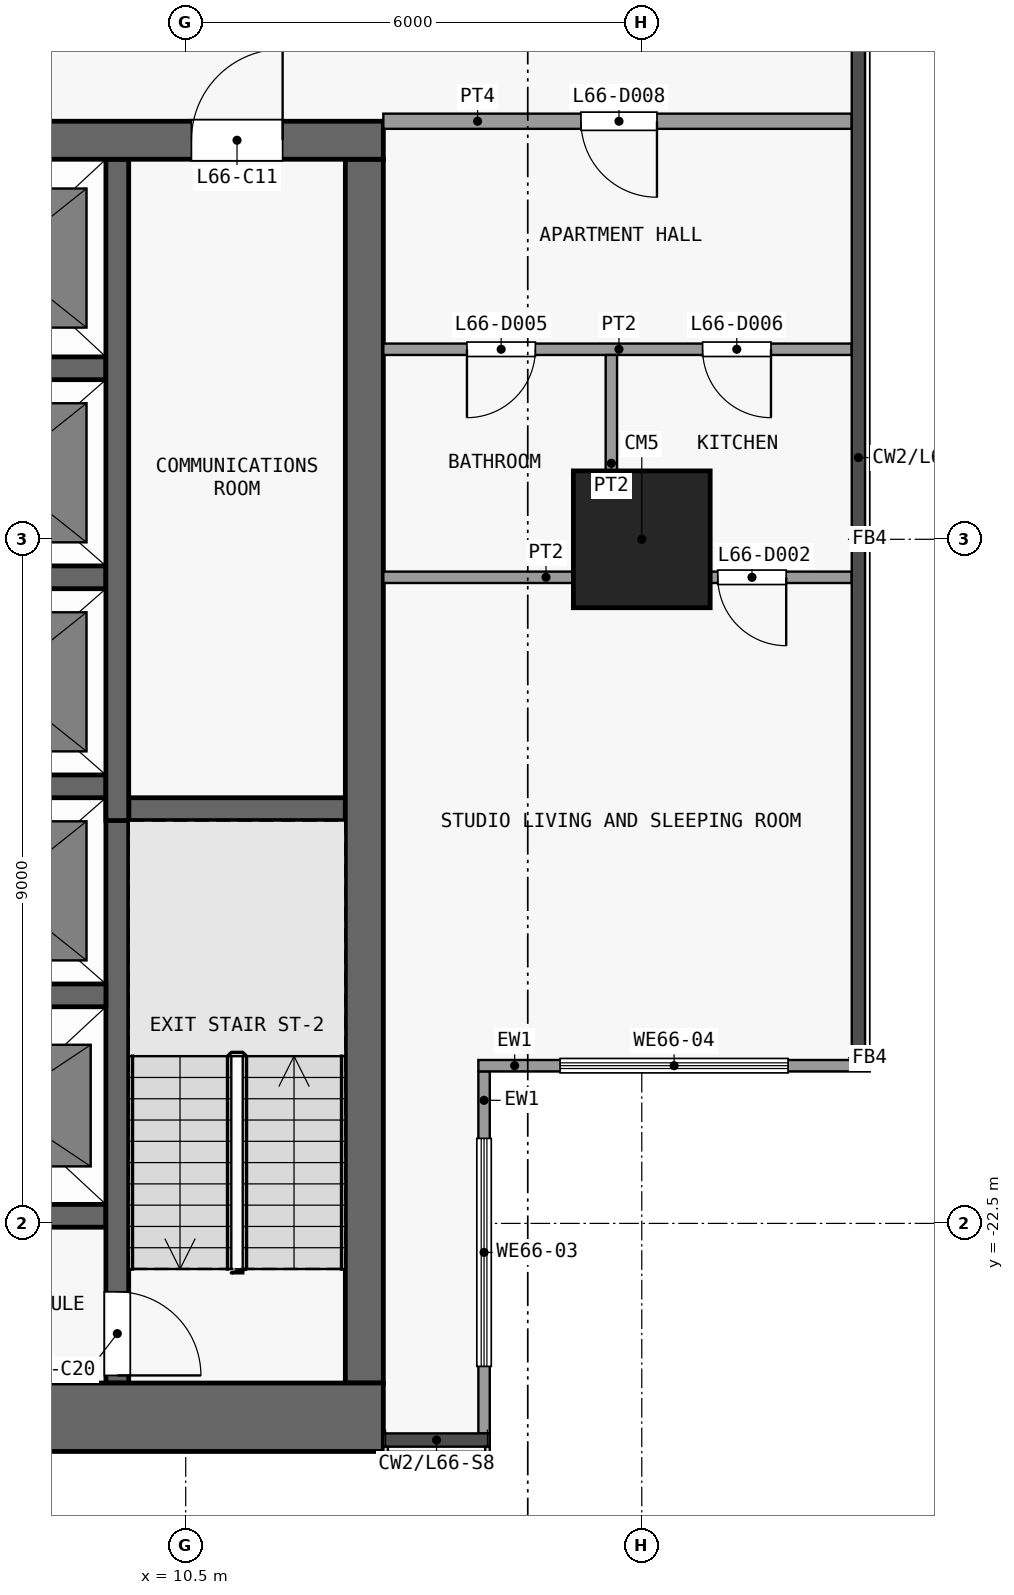
"""IFC4 building model, lengths in metres.
Left out: names, types, materials, properties, quantities, classifications, styles, units other than length and angle.
Written with IfcOpenShell. Run it as: python <this file> out.ifc"""

import sys

from ifc_helpers import new_model, si_unit, direction, frame, frame_2d, origin, origin_2d, place, context, subcontext, project, spatial, rectangle, extrude, element, fill, save


model = new_model("IFC4")
c1 = context("Model", 3, precision=1e-05, world=origin(), true_north=direction((0.0, 1.0)))
c2 = subcontext(c1, "Body", "Model", "MODEL_VIEW")
j1 = project(units=[si_unit("LENGTHUNIT", "METRE"), si_unit("PLANEANGLEUNIT", "RADIAN")], contexts=[c1])
p1 = place(None, origin())
s1 = spatial("IfcSite", under=j1, at=p1, CompositionType="ELEMENT")
p2 = place(p1, origin())
s2 = spatial("IfcBuilding", under=s1, at=p2, CompositionType="ELEMENT")
p3 = place(p2, frame((0.0, 0.0, 262.7)))
s3 = spatial("IfcBuildingStorey", under=s2, at=p3, CompositionType="ELEMENT", Elevation=262.7)
p4 = place(p3, frame((16.5, -13.5, 0.0), z_axis=(0.0, 0.0, 1.0), x_axis=(1.0, 0.0, 0.0)))
e1 = element("IfcColumn", 1, at=p4, inside=s3, PredefinedType="COLUMN", context=c2, shape_type="SweptSolid", body=[
    extrude(rectangle(XDim=1.8, YDim=1.8, at=origin_2d()), origin(), (0.0, 0.0, 1.0), 3.6),
])
p5 = place(p3, frame((-13.1, -25.05, 0.0), z_axis=(0.0, 0.0, 1.0), x_axis=(1.0, 0.0, 0.0)))
e2 = element("IfcWall", 2, at=p5, inside=s3, PredefinedType="SHEAR", context=c2, shape_type="SweptSolid", body=[
    extrude(rectangle(XDim=26.2, YDim=0.9, at=frame_2d((13.1, 0.0))), origin(), (0.0, 0.0, 1.0), 3.3),
])
p6 = place(p3, frame((-13.1, -8.25, 0.0), z_axis=(0.0, 0.0, 1.0), x_axis=(1.0, 0.0, 0.0)))
e3 = element("IfcWall", 3, at=p6, inside=s3, PredefinedType="SHEAR", context=c2, shape_type="SweptSolid", body=[
    extrude(rectangle(XDim=26.2, YDim=0.5, at=frame_2d((13.1, 0.0))), origin(), (0.0, 0.0, 1.0), 3.3),
])
p7 = place(p6, frame((7.4, 0.0, 0.0)))
e4 = element("IfcOpeningElement", 4, at=p7, cuts=e3, PredefinedType="OPENING", context=c2, shape_type="SweptSolid", body=[
    extrude(rectangle(XDim=1.8, YDim=2.1, at=frame_2d((0.9, 1.05))), frame((0.0, 0.26, 0.0), z_axis=(0.0, -1.0, 0.0), x_axis=(1.0, 0.0, 0.0)), (0.0, 0.0, 1.0), 0.52),
])
p8 = place(p6, frame((17.0, 0.0, 0.0)))
e5 = element("IfcOpeningElement", 5, at=p8, cuts=e3, PredefinedType="OPENING", context=c2, shape_type="SweptSolid", body=[
    extrude(rectangle(XDim=1.8, YDim=2.1, at=frame_2d((0.9, 1.05))), frame((0.0, 0.26, 0.0), z_axis=(0.0, -1.0, 0.0), x_axis=(1.0, 0.0, 0.0)), (0.0, 0.0, 1.0), 0.52),
])
p9 = place(p6, frame((2.325, 0.0, 0.0)))
e6 = element("IfcOpeningElement", 6, at=p9, cuts=e3, PredefinedType="OPENING", context=c2, shape_type="SweptSolid", body=[
    extrude(rectangle(XDim=0.9, YDim=2.1, at=frame_2d((0.45, 1.05))), frame((0.0, 0.26, 0.0), z_axis=(0.0, -1.0, 0.0), x_axis=(1.0, 0.0, 0.0)), (0.0, 0.0, 1.0), 0.52),
])
p10 = place(p6, frame((23.675, 0.0, 0.0)))
e7 = element("IfcOpeningElement", 7, at=p10, cuts=e3, PredefinedType="OPENING", context=c2, shape_type="SweptSolid", body=[
    extrude(rectangle(XDim=1.2, YDim=2.1, at=frame_2d((0.6, 1.05))), frame((0.0, 0.26, 0.0), z_axis=(0.0, -1.0, 0.0), x_axis=(1.0, 0.0, 0.0)), (0.0, 0.0, 1.0), 0.52),
])
p11 = place(p3, frame((12.85, -24.6, 0.0), z_axis=(0.0, 0.0, 1.0), x_axis=(0.0, 1.0, 0.0)))
e8 = element("IfcWall", 8, at=p11, inside=s3, PredefinedType="SHEAR", context=c2, shape_type="SweptSolid", body=[
    extrude(rectangle(XDim=16.1, YDim=0.5, at=frame_2d((8.05, 0.0))), origin(), (0.0, 0.0, 1.0), 3.3),
])
for number, where, z_axis, x_axis in (
    (9, (6.65, -22.4, 0.0), (0.0, 0.0, 1.0), (1.0, 0.0, 0.0)),
    (10, (6.65, -19.5, 0.0), (0.0, 0.0, 1.0), (1.0, 0.0, 0.0)),
):
    element("IfcWall", number, at=place(p3, frame(where, z_axis=z_axis, x_axis=x_axis)), inside=s3, PredefinedType="SHEAR", context=c2, shape_type="SweptSolid", body=[
        extrude(rectangle(XDim=2.8, YDim=0.3, at=frame_2d((1.4, 0.0))), origin(), (0.0, 0.0, 1.0), 3.3),
    ])
p12 = place(p3, frame((9.75, -17.05, 0.0), z_axis=(0.0, 0.0, 1.0), x_axis=(1.0, 0.0, 0.0)))
e11 = element("IfcWall", 11, at=p12, inside=s3, PredefinedType="SHEAR", context=c2, shape_type="SweptSolid", body=[
    extrude(rectangle(XDim=2.85, YDim=0.3, at=frame_2d((1.425, 0.0))), origin(), (0.0, 0.0, 1.0), 3.3),
])
for number, where, z_axis, x_axis in (
    (12, (6.65, -16.75, 0.0), (0.0, 0.0, 1.0), (1.0, 0.0, 0.0)),
    (13, (6.65, -14.0, 0.0), (0.0, 0.0, 1.0), (1.0, 0.0, 0.0)),
    (14, (6.65, -11.25, 0.0), (0.0, 0.0, 1.0), (1.0, 0.0, 0.0)),
):
    element("IfcWall", number, at=place(p3, frame(where, z_axis=z_axis, x_axis=x_axis)), inside=s3, PredefinedType="SHEAR", context=c2, shape_type="SweptSolid", body=[
        extrude(rectangle(XDim=2.8, YDim=0.3, at=frame_2d((1.4, 0.0))), origin(), (0.0, 0.0, 1.0), 3.3),
    ])
p13 = place(p3, frame((9.6, -16.9, 0.0), z_axis=(0.0, 0.0, 1.0), x_axis=(0.0, -1.0, 0.0)))
e15 = element("IfcWall", 15, at=p13, inside=s3, PredefinedType="SHEAR", context=c2, shape_type="SweptSolid", body=[
    extrude(rectangle(XDim=7.7, YDim=0.3, at=frame_2d((3.85, 0.0))), origin(), (0.0, 0.0, 1.0), 3.3),
])
p14 = place(p13, frame((6.5, 0.0, 0.0)))
e16 = element("IfcOpeningElement", 16, at=p14, cuts=e15, PredefinedType="OPENING", context=c2, shape_type="SweptSolid", body=[
    extrude(rectangle(XDim=1.1, YDim=2.1, at=frame_2d((0.55, 1.05))), frame((0.0, 0.16, 0.0), z_axis=(0.0, -1.0, 0.0), x_axis=(1.0, 0.0, 0.0)), (0.0, 0.0, 1.0), 0.32),
])
p15 = place(p3, frame((9.6, -17.2, 0.0), z_axis=(0.0, 0.0, 1.0), x_axis=(0.0, 1.0, 0.0)))
e17 = element("IfcWall", 17, at=p15, inside=s3, PredefinedType="SHEAR", context=c2, shape_type="SweptSolid", body=[
    extrude(rectangle(XDim=8.7, YDim=0.3, at=frame_2d((4.35, 0.0))), origin(), (0.0, 0.0, 1.0), 3.3),
])
p16 = place(p3, frame((14.425, -20.5, 0.0), z_axis=(0.0, 0.0, 1.0), x_axis=(0.0, -1.0, 0.0)))
e18 = element("IfcWall", 18, at=p16, inside=s3, PredefinedType="SOLIDWALL", context=c2, shape_type="SweptSolid", body=[
    extrude(rectangle(XDim=4.762, YDim=0.15, at=frame_2d((2.381, 0.0))), origin(), (0.0, 0.0, 1.0), 3.3),
])
p17 = place(p16, frame((0.881, 0.0, 0.9)))
e19 = element("IfcOpeningElement", 19, at=p17, cuts=e18, PredefinedType="OPENING", context=c2, shape_type="SweptSolid", body=[
    extrude(rectangle(XDim=3.0, YDim=2.4, at=frame_2d((1.5, 1.2))), frame((0.0, 0.085, 0.0), z_axis=(0.0, -1.0, 0.0), x_axis=(1.0, 0.0, 0.0)), (0.0, 0.0, 1.0), 0.17),
])
p18 = place(p3, frame((19.5, -20.425, 0.0), z_axis=(0.0, 0.0, 1.0), x_axis=(-1.0, 0.0, 0.0)))
e20 = element("IfcWall", 20, at=p18, inside=s3, PredefinedType="SOLIDWALL", context=c2, shape_type="SweptSolid", body=[
    extrude(rectangle(XDim=5.15, YDim=0.15, at=frame_2d((2.575, 0.0))), origin(), (0.0, 0.0, 1.0), 3.3),
])
p19 = place(p18, frame((1.075, 0.0, 0.9)))
e21 = element("IfcOpeningElement", 21, at=p19, cuts=e20, PredefinedType="OPENING", context=c2, shape_type="SweptSolid", body=[
    extrude(rectangle(XDim=3.0, YDim=2.4, at=frame_2d((1.5, 1.2))), frame((0.0, 0.085, 0.0), z_axis=(0.0, -1.0, 0.0), x_axis=(1.0, 0.0, 0.0)), (0.0, 0.0, 1.0), 0.17),
])
p20 = place(p3, frame((13.1, -14.0, 0.0), z_axis=(0.0, 0.0, 1.0), x_axis=(1.0, 0.0, 0.0)))
e22 = element("IfcWall", 22, at=p20, inside=s3, PredefinedType="PARTITIONING", context=c2, shape_type="SweptSolid", body=[
    extrude(rectangle(XDim=6.162, YDim=0.15, at=frame_2d((3.081, 0.0))), origin(), (0.0, 0.0, 1.0), 3.3),
])
p21 = place(p20, frame((4.4, 0.0, 0.0)))
e23 = element("IfcOpeningElement", 23, at=p21, cuts=e22, PredefinedType="OPENING", context=c2, shape_type="SweptSolid", body=[
    extrude(rectangle(XDim=0.9, YDim=2.1, at=frame_2d((0.45, 1.05))), frame((0.0, 0.085, 0.0), z_axis=(0.0, -1.0, 0.0), x_axis=(1.0, 0.0, 0.0)), (0.0, 0.0, 1.0), 0.17),
])
p22 = place(p3, frame((13.1, -11.0, 0.0), z_axis=(0.0, 0.0, 1.0), x_axis=(1.0, 0.0, 0.0)))
e24 = element("IfcWall", 24, at=p22, inside=s3, PredefinedType="PARTITIONING", context=c2, shape_type="SweptSolid", body=[
    extrude(rectangle(XDim=6.162, YDim=0.15, at=frame_2d((3.081, 0.0))), origin(), (0.0, 0.0, 1.0), 3.3),
])
p23 = place(p22, frame((1.1, 0.0, 0.0)))
e25 = element("IfcOpeningElement", 25, at=p23, cuts=e24, PredefinedType="OPENING", context=c2, shape_type="SweptSolid", body=[
    extrude(rectangle(XDim=0.9, YDim=2.1, at=frame_2d((0.45, 1.05))), frame((0.0, 0.085, 0.0), z_axis=(0.0, -1.0, 0.0), x_axis=(1.0, 0.0, 0.0)), (0.0, 0.0, 1.0), 0.17),
])
p24 = place(p22, frame((4.2, 0.0, 0.0)))
e26 = element("IfcOpeningElement", 26, at=p24, cuts=e24, PredefinedType="OPENING", context=c2, shape_type="SweptSolid", body=[
    extrude(rectangle(XDim=0.9, YDim=2.1, at=frame_2d((0.45, 1.05))), frame((0.0, 0.085, 0.0), z_axis=(0.0, -1.0, 0.0), x_axis=(1.0, 0.0, 0.0)), (0.0, 0.0, 1.0), 0.17),
])
p25 = place(p3, frame((13.1, -8.0, 0.0), z_axis=(0.0, 0.0, 1.0), x_axis=(1.0, 0.0, 0.0)))
e27 = element("IfcWall", 27, at=p25, inside=s3, PredefinedType="PARTITIONING", context=c2, shape_type="SweptSolid", body=[
    extrude(rectangle(XDim=6.162, YDim=0.2, at=frame_2d((3.081, 0.0))), origin(), (0.0, 0.0, 1.0), 3.3),
])
p26 = place(p25, frame((2.6, 0.0, 0.0)))
e28 = element("IfcOpeningElement", 28, at=p26, cuts=e27, PredefinedType="OPENING", context=c2, shape_type="SweptSolid", body=[
    extrude(rectangle(XDim=1.0, YDim=2.1, at=frame_2d((0.5, 1.05))), frame((0.0, 0.11, 0.0), z_axis=(0.0, -1.0, 0.0), x_axis=(1.0, 0.0, 0.0)), (0.0, 0.0, 1.0), 0.22),
])
p27 = place(p3, frame((16.1, -13.925, 0.0), z_axis=(0.0, 0.0, 1.0), x_axis=(0.0, 1.0, 0.0)))
e29 = element("IfcWall", 29, at=p27, inside=s3, PredefinedType="PARTITIONING", context=c2, shape_type="SweptSolid", body=[
    extrude(rectangle(XDim=2.85, YDim=0.15, at=frame_2d((1.425, 0.0))), origin(), (0.0, 0.0, 1.0), 3.3),
])
p28 = place(p10, origin())
e30 = element("IfcDoor", 30, at=p28, inside=s3, OperationType="SINGLE_SWING_RIGHT", PredefinedType="DOOR", context=c2, shape_type="SweptSolid", body=[
    extrude(rectangle(XDim=1.2, YDim=2.1, at=frame_2d((0.6, 1.05))), frame((0.0, 0.025, 0.0), z_axis=(0.0, -1.0, 0.0), x_axis=(1.0, 0.0, 0.0)), (0.0, 0.0, 1.0), 0.05),
])
fill(e7, e30)
p29 = place(p14, origin())
e31 = element("IfcDoor", 31, at=p29, inside=s3, OperationType="SINGLE_SWING_RIGHT", PredefinedType="DOOR", context=c2, shape_type="SweptSolid", body=[
    extrude(rectangle(XDim=1.1, YDim=2.1, at=frame_2d((0.55, 1.05))), frame((0.0, 0.025, 0.0), z_axis=(0.0, -1.0, 0.0), x_axis=(1.0, 0.0, 0.0)), (0.0, 0.0, 1.0), 0.05),
])
fill(e16, e31)
p30 = place(p17, origin())
e32 = element("IfcWindow", 32, at=p30, inside=s3, PartitioningType="SINGLE_PANEL", PredefinedType="WINDOW", context=c2, shape_type="SweptSolid", body=[
    extrude(rectangle(XDim=3.0, YDim=2.4, at=frame_2d((1.5, 1.2))), frame((0.0, 0.03, 0.0), z_axis=(0.0, -1.0, 0.0), x_axis=(1.0, 0.0, 0.0)), (0.0, 0.0, 1.0), 0.06),
])
fill(e19, e32)
p31 = place(p19, origin())
e33 = element("IfcWindow", 33, at=p31, inside=s3, PartitioningType="SINGLE_PANEL", PredefinedType="WINDOW", context=c2, shape_type="SweptSolid", body=[
    extrude(rectangle(XDim=3.0, YDim=2.4, at=frame_2d((1.5, 1.2))), frame((0.0, 0.03, 0.0), z_axis=(0.0, -1.0, 0.0), x_axis=(1.0, 0.0, 0.0)), (0.0, 0.0, 1.0), 0.06),
])
fill(e21, e33)
p32 = place(p21, origin())
e34 = element("IfcDoor", 34, at=p32, inside=s3, OperationType="SINGLE_SWING_RIGHT", PredefinedType="DOOR", context=c2, shape_type="SweptSolid", body=[
    extrude(rectangle(XDim=0.9, YDim=2.1, at=frame_2d((0.45, 1.05))), frame((0.0, 0.025, 0.0), z_axis=(0.0, -1.0, 0.0), x_axis=(1.0, 0.0, 0.0)), (0.0, 0.0, 1.0), 0.05),
])
fill(e23, e34)
p33 = place(p23, origin())
e35 = element("IfcDoor", 35, at=p33, inside=s3, OperationType="SINGLE_SWING_LEFT", PredefinedType="DOOR", context=c2, shape_type="SweptSolid", body=[
    extrude(rectangle(XDim=0.9, YDim=2.1, at=frame_2d((0.45, 1.05))), frame((0.0, 0.025, 0.0), z_axis=(0.0, -1.0, 0.0), x_axis=(1.0, 0.0, 0.0)), (0.0, 0.0, 1.0), 0.05),
])
fill(e25, e35)
p34 = place(p24, origin())
e36 = element("IfcDoor", 36, at=p34, inside=s3, OperationType="SINGLE_SWING_RIGHT", PredefinedType="DOOR", context=c2, shape_type="SweptSolid", body=[
    extrude(rectangle(XDim=0.9, YDim=2.1, at=frame_2d((0.45, 1.05))), frame((0.0, 0.025, 0.0), z_axis=(0.0, -1.0, 0.0), x_axis=(1.0, 0.0, 0.0)), (0.0, 0.0, 1.0), 0.05),
])
fill(e26, e36)
p35 = place(p26, origin())
e37 = element("IfcDoor", 37, at=p35, inside=s3, OperationType="SINGLE_SWING_RIGHT", PredefinedType="DOOR", context=c2, shape_type="SweptSolid", body=[
    extrude(rectangle(XDim=1.0, YDim=2.1, at=frame_2d((0.5, 1.05))), frame((0.0, 0.025, 0.0), z_axis=(0.0, -1.0, 0.0), x_axis=(1.0, 0.0, 0.0)), (0.0, 0.0, 1.0), 0.05),
])
fill(e28, e37)
save(model, sys.argv[1])
